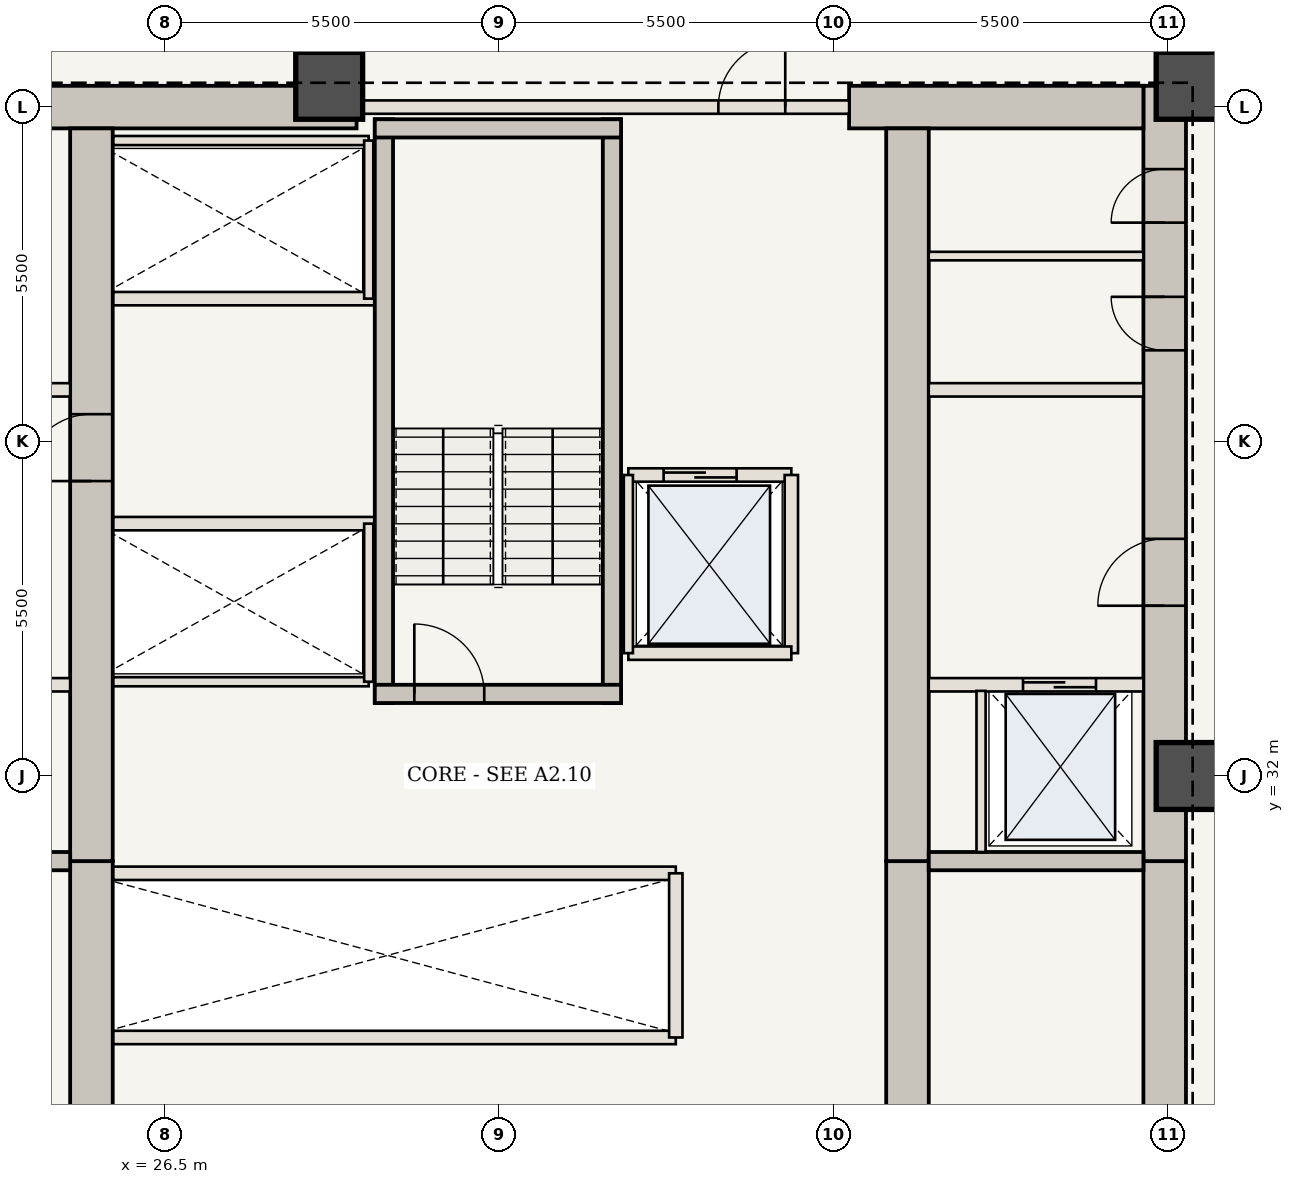
"""IFC4 building model, lengths in metres.
Left out: names, types, materials, properties, quantities, classifications, styles, units other than length and angle.
Written with IfcOpenShell. Run it as: python <this file> out.ifc"""

import sys

from ifc_helpers import new_model, si_unit, direction, frame, frame_2d, origin, origin_2d, place, context, subcontext, project, spatial, rectangle, extrude, element, fill, save


model = new_model("IFC4")
c1 = context("Model", 3, precision=1e-05, world=origin(), true_north=direction((0.0, 1.0)))
c2 = subcontext(c1, "Body", "Model", "MODEL_VIEW")
j1 = project(units=[si_unit("LENGTHUNIT", "METRE"), si_unit("PLANEANGLEUNIT", "RADIAN")], contexts=[c1])
p1 = place(None, origin())
s1 = spatial("IfcSite", under=j1, at=p1, CompositionType="ELEMENT")
p2 = place(p1, origin())
s2 = spatial("IfcBuilding", under=s1, at=p2, CompositionType="ELEMENT")
p3 = place(p2, frame((0.0, 0.0, 38.85)))
s3 = spatial("IfcBuildingStorey", under=s2, at=p3, CompositionType="ELEMENT", Elevation=38.85)
p4 = place(p3, frame((42.94, 20.6, 0.0), z_axis=(0.0, 0.0, 1.0), x_axis=(0.0, 1.0, 0.0)))
e1 = element("IfcWall", 1, at=p4, inside=s3, PredefinedType="SHEAR", context=c2, shape_type="SweptSolid", body=[
    extrude(rectangle(XDim=10.0, YDim=0.7, at=frame_2d((5.0, 0.0))), origin(), (0.0, 0.0, 1.0), 3.5),
])
p5 = place(p4, frame((1.15, 0.0, 0.0)))
e2 = element("IfcOpeningElement", 2, at=p5, cuts=e1, PredefinedType="OPENING", context=c2, shape_type="SweptSolid", body=[
    extrude(rectangle(XDim=1.15, YDim=2.15, at=frame_2d((0.575, 1.075))), frame((0.0, 0.36, 0.0), z_axis=(0.0, -1.0, 0.0), x_axis=(1.0, 0.0, 0.0)), (0.0, 0.0, 1.0), 0.72),
])
p6 = place(p3, frame((42.94, 30.6, 0.0), z_axis=(0.0, 0.0, 1.0), x_axis=(0.0, 1.0, 0.0)))
e3 = element("IfcWall", 3, at=p6, inside=s3, PredefinedType="SHEAR", context=c2, shape_type="SweptSolid", body=[
    extrude(rectangle(XDim=12.75, YDim=0.7, at=frame_2d((6.375, 0.0))), origin(), (0.0, 0.0, 1.0), 3.5),
])
p7 = place(p6, frame((4.2, 0.0, 0.0)))
e4 = element("IfcOpeningElement", 4, at=p7, cuts=e3, PredefinedType="OPENING", context=c2, shape_type="SweptSolid", body=[
    extrude(rectangle(XDim=1.1, YDim=2.15, at=frame_2d((0.55, 1.075))), frame((0.0, 0.36, 0.0), z_axis=(0.0, -1.0, 0.0), x_axis=(1.0, 0.0, 0.0)), (0.0, 0.0, 1.0), 0.72),
])
p8 = place(p6, frame((8.4, 0.0, 0.0)))
e5 = element("IfcOpeningElement", 5, at=p8, cuts=e3, PredefinedType="OPENING", context=c2, shape_type="SweptSolid", body=[
    extrude(rectangle(XDim=0.88, YDim=2.1, at=frame_2d((0.44, 1.05))), frame((0.0, 0.36, 0.0), z_axis=(0.0, -1.0, 0.0), x_axis=(1.0, 0.0, 0.0)), (0.0, 0.0, 1.0), 0.72),
])
p9 = place(p6, frame((10.5, 0.0, 0.0)))
e6 = element("IfcOpeningElement", 6, at=p9, cuts=e3, PredefinedType="OPENING", context=c2, shape_type="SweptSolid", body=[
    extrude(rectangle(XDim=0.88, YDim=2.1, at=frame_2d((0.44, 1.05))), frame((0.0, 0.36, 0.0), z_axis=(0.0, -1.0, 0.0), x_axis=(1.0, 0.0, 0.0)), (0.0, 0.0, 1.0), 0.72),
])
p10 = place(p3, frame((21.41, 43.0, 0.0), z_axis=(0.0, 0.0, 1.0), x_axis=(1.0, 0.0, 0.0)))
e7 = element("IfcWall", 7, at=p10, inside=s3, PredefinedType="SHEAR", context=c2, shape_type="SweptSolid", body=[
    extrude(rectangle(XDim=8.24, YDim=0.7, at=frame_2d((4.12, 0.0))), origin(), (0.0, 0.0, 1.0), 3.5),
])
p11 = place(p3, frame((37.75, 43.0, 0.0), z_axis=(0.0, 0.0, 1.0), x_axis=(1.0, 0.0, 0.0)))
e8 = element("IfcWall", 8, at=p11, inside=s3, PredefinedType="SHEAR", context=c2, shape_type="SweptSolid", body=[
    extrude(rectangle(XDim=4.84, YDim=0.7, at=frame_2d((2.42, 0.0))), origin(), (0.0, 0.0, 1.0), 3.5),
])
p12 = place(p3, frame((25.29, 21.3, 0.0), z_axis=(0.0, 0.0, 1.0), x_axis=(0.0, 1.0, 0.0)))
e9 = element("IfcWall", 9, at=p12, inside=s3, PredefinedType="SHEAR", context=c2, shape_type="SweptSolid", body=[
    extrude(rectangle(XDim=9.3, YDim=0.7, at=frame_2d((4.65, 0.0))), origin(), (0.0, 0.0, 1.0), 3.5),
])
p13 = place(p3, frame((25.29, 30.6, 0.0), z_axis=(0.0, 0.0, 1.0), x_axis=(0.0, 1.0, 0.0)))
e10 = element("IfcWall", 10, at=p13, inside=s3, PredefinedType="SHEAR", context=c2, shape_type="SweptSolid", body=[
    extrude(rectangle(XDim=12.05, YDim=0.7, at=frame_2d((6.025, 0.0))), origin(), (0.0, 0.0, 1.0), 3.5),
])
p14 = place(p13, frame((6.25, 0.0, 0.0)))
e11 = element("IfcOpeningElement", 11, at=p14, cuts=e10, PredefinedType="OPENING", context=c2, shape_type="SweptSolid", body=[
    extrude(rectangle(XDim=1.1, YDim=2.15, at=frame_2d((0.55, 1.075))), frame((0.0, 0.36, 0.0), z_axis=(0.0, -1.0, 0.0), x_axis=(1.0, 0.0, 0.0)), (0.0, 0.0, 1.0), 0.72),
])
p15 = place(p3, frame((38.71, 21.3, 0.0), z_axis=(0.0, 0.0, 1.0), x_axis=(0.0, 1.0, 0.0)))
e12 = element("IfcWall", 12, at=p15, inside=s3, PredefinedType="SHEAR", context=c2, shape_type="SweptSolid", body=[
    extrude(rectangle(XDim=9.3, YDim=0.7, at=frame_2d((4.65, 0.0))), origin(), (0.0, 0.0, 1.0), 3.5),
])
p16 = place(p3, frame((38.71, 30.6, 0.0), z_axis=(0.0, 0.0, 1.0), x_axis=(0.0, 1.0, 0.0)))
e13 = element("IfcWall", 13, at=p16, inside=s3, PredefinedType="SHEAR", context=c2, shape_type="SweptSolid", body=[
    extrude(rectangle(XDim=12.05, YDim=0.7, at=frame_2d((6.025, 0.0))), origin(), (0.0, 0.0, 1.0), 3.5),
])
for number, where, z_axis, x_axis in (
    (14, (43.35, 32.0, 0.0), (0.0, 0.0, 1.0), (1.0, 0.0, 0.0)),
    (15, (43.35, 43.35, 0.0), (0.0, 0.0, 1.0), (1.0, 0.0, 0.0)),
    (16, (29.2, 43.35, 0.0), (0.0, 0.0, 1.0), (1.0, 0.0, 0.0)),
):
    element("IfcColumn", number, at=place(p3, frame(where, z_axis=z_axis, x_axis=x_axis)), inside=s3, PredefinedType="COLUMN", context=c2, shape_type="SweptSolid", body=[
        extrude(rectangle(XDim=1.1, YDim=1.1, at=origin_2d()), origin(), (0.0, 0.0, 1.0), 3.5),
    ])
for number, where, z_axis, x_axis in (
    (17, (21.41, 30.6, 0.0), (0.0, 0.0, 1.0), (1.0, 0.0, 0.0)),
    (18, (39.06, 30.6, 0.0), (0.0, 0.0, 1.0), (1.0, 0.0, 0.0)),
):
    element("IfcWall", number, at=place(p3, frame(where, z_axis=z_axis, x_axis=x_axis)), inside=s3, PredefinedType="SHEAR", context=c2, shape_type="SweptSolid", body=[
        extrude(rectangle(XDim=3.53, YDim=0.3, at=frame_2d((1.765, 0.0))), origin(), (0.0, 0.0, 1.0), 3.08),
    ])
p17 = place(p3, frame((21.41, 33.5, 0.0), z_axis=(0.0, 0.0, 1.0), x_axis=(1.0, 0.0, 0.0)))
e19 = element("IfcWall", 19, at=p17, inside=s3, PredefinedType="STANDARD", context=c2, shape_type="SweptSolid", body=[
    extrude(rectangle(XDim=3.53, YDim=0.22, at=frame_2d((1.765, 0.0))), origin(), (0.0, 0.0, 1.0), 3.08),
])
p18 = place(p17, frame((0.75, 0.0, 0.0)))
e20 = element("IfcOpeningElement", 20, at=p18, cuts=e19, PredefinedType="OPENING", context=c2, shape_type="SweptSolid", body=[
    extrude(rectangle(XDim=1.2, YDim=2.2, at=frame_2d((0.6, 1.1))), frame((0.0, 0.12, 0.0), z_axis=(0.0, -1.0, 0.0), x_axis=(1.0, 0.0, 0.0)), (0.0, 0.0, 1.0), 0.24),
])
p19 = place(p3, frame((39.06, 33.5, 0.0), z_axis=(0.0, 0.0, 1.0), x_axis=(1.0, 0.0, 0.0)))
e21 = element("IfcWall", 21, at=p19, inside=s3, PredefinedType="STANDARD", context=c2, shape_type="SweptSolid", body=[
    extrude(rectangle(XDim=3.53, YDim=0.22, at=frame_2d((1.765, 0.0))), origin(), (0.0, 0.0, 1.0), 3.08),
])
p20 = place(p19, frame((1.55, 0.0, 0.0)))
e22 = element("IfcOpeningElement", 22, at=p20, cuts=e21, PredefinedType="OPENING", context=c2, shape_type="SweptSolid", body=[
    extrude(rectangle(XDim=1.2, YDim=2.2, at=frame_2d((0.6, 1.1))), frame((0.0, 0.12, 0.0), z_axis=(0.0, -1.0, 0.0), x_axis=(1.0, 0.0, 0.0)), (0.0, 0.0, 1.0), 0.24),
])
p21 = place(p3, frame((39.92, 30.75, 0.0), z_axis=(0.0, 0.0, 1.0), x_axis=(0.0, 1.0, 0.0)))
e23 = element("IfcWall", 23, at=p21, inside=s3, PredefinedType="STANDARD", context=c2, shape_type="SweptSolid", body=[
    extrude(rectangle(XDim=2.65, YDim=0.15, at=frame_2d((1.325, 0.0))), origin(), (0.0, 0.0, 1.0), 3.08),
])
for number, where, z_axis, x_axis in (
    (24, (21.41, 38.35, 0.0), (0.0, 0.0, 1.0), (1.0, 0.0, 0.0)),
    (25, (39.06, 38.35, 0.0), (0.0, 0.0, 1.0), (1.0, 0.0, 0.0)),
):
    element("IfcWall", number, at=place(p3, frame(where, z_axis=z_axis, x_axis=x_axis)), inside=s3, PredefinedType="STANDARD", context=c2, shape_type="SweptSolid", body=[
        extrude(rectangle(XDim=3.53, YDim=0.22, at=frame_2d((1.765, 0.0))), origin(), (0.0, 0.0, 1.0), 3.08),
    ])
p22 = place(p3, frame((39.06, 40.55, 0.0), z_axis=(0.0, 0.0, 1.0), x_axis=(1.0, 0.0, 0.0)))
e26 = element("IfcWall", 26, at=p22, inside=s3, PredefinedType="STANDARD", context=c2, shape_type="SweptSolid", body=[
    extrude(rectangle(XDim=3.53, YDim=0.14, at=frame_2d((1.765, 0.0))), origin(), (0.0, 0.0, 1.0), 3.08),
])
for number, where, z_axis, x_axis in (
    (27, (25.65, 27.7, 0.0), (0.0, 0.0, 1.0), (1.0, 0.0, 0.0)),
    (28, (25.65, 30.4, 0.0), (0.0, 0.0, 1.0), (1.0, 0.0, 0.0)),
):
    element("IfcWall", number, at=place(p3, frame(where, z_axis=z_axis, x_axis=x_axis)), inside=s3, PredefinedType="STANDARD", context=c2, shape_type="SweptSolid", body=[
        extrude(rectangle(XDim=9.25, YDim=0.22, at=frame_2d((4.625, 0.0))), origin(), (0.0, 0.0, 1.0), 3.08),
    ])
p23 = place(p3, frame((34.9, 27.7, 0.0), z_axis=(0.0, 0.0, 1.0), x_axis=(0.0, 1.0, 0.0)))
e29 = element("IfcWall", 29, at=p23, inside=s3, PredefinedType="STANDARD", context=c2, shape_type="SweptSolid", body=[
    extrude(rectangle(XDim=2.7, YDim=0.22, at=frame_2d((1.35, 0.0))), origin(), (0.0, 0.0, 1.0), 3.08),
])
p24 = place(p3, frame((25.65, 36.15, 0.0), z_axis=(0.0, 0.0, 1.0), x_axis=(1.0, 0.0, 0.0)))
e30 = element("IfcWall", 30, at=p24, inside=s3, PredefinedType="STANDARD", context=c2, shape_type="SweptSolid", body=[
    extrude(rectangle(XDim=4.3, YDim=0.22, at=frame_2d((2.15, 0.0))), origin(), (0.0, 0.0, 1.0), 3.08),
])
p25 = place(p3, frame((25.65, 33.55, 0.0), z_axis=(0.0, 0.0, 1.0), x_axis=(1.0, 0.0, 0.0)))
e31 = element("IfcWall", 31, at=p25, inside=s3, PredefinedType="STANDARD", context=c2, shape_type="SweptSolid", body=[
    extrude(rectangle(XDim=4.2, YDim=0.15, at=frame_2d((2.1, 0.0))), origin(), (0.0, 0.0, 1.0), 3.08),
])
p26 = place(p3, frame((29.85, 33.55, 0.0), z_axis=(0.0, 0.0, 1.0), x_axis=(0.0, 1.0, 0.0)))
e32 = element("IfcWall", 32, at=p26, inside=s3, PredefinedType="STANDARD", context=c2, shape_type="SweptSolid", body=[
    extrude(rectangle(XDim=2.6, YDim=0.15, at=frame_2d((1.3, 0.0))), origin(), (0.0, 0.0, 1.0), 3.08),
])
p27 = place(p3, frame((25.65, 39.85, 0.0), z_axis=(0.0, 0.0, 1.0), x_axis=(1.0, 0.0, 0.0)))
e33 = element("IfcWall", 33, at=p27, inside=s3, PredefinedType="STANDARD", context=c2, shape_type="SweptSolid", body=[
    extrude(rectangle(XDim=4.3, YDim=0.22, at=frame_2d((2.15, 0.0))), origin(), (0.0, 0.0, 1.0), 3.08),
])
p28 = place(p3, frame((25.65, 42.45, 0.0), z_axis=(0.0, 0.0, 1.0), x_axis=(1.0, 0.0, 0.0)))
e34 = element("IfcWall", 34, at=p28, inside=s3, PredefinedType="STANDARD", context=c2, shape_type="SweptSolid", body=[
    extrude(rectangle(XDim=4.2, YDim=0.15, at=frame_2d((2.1, 0.0))), origin(), (0.0, 0.0, 1.0), 3.08),
])
p29 = place(p3, frame((29.85, 39.85, 0.0), z_axis=(0.0, 0.0, 1.0), x_axis=(0.0, 1.0, 0.0)))
e35 = element("IfcWall", 35, at=p29, inside=s3, PredefinedType="STANDARD", context=c2, shape_type="SweptSolid", body=[
    extrude(rectangle(XDim=2.6, YDim=0.15, at=frame_2d((1.3, 0.0))), origin(), (0.0, 0.0, 1.0), 3.08),
])
for number, where, z_axis, x_axis in (
    (36, (30.1, 33.2, 0.0), (0.0, 0.0, 1.0), (0.0, 1.0, 0.0)),
    (37, (33.85, 33.2, 0.0), (0.0, 0.0, 1.0), (0.0, 1.0, 0.0)),
):
    element("IfcWall", number, at=place(p3, frame(where, z_axis=z_axis, x_axis=x_axis)), inside=s3, PredefinedType="SHEAR", context=c2, shape_type="SweptSolid", body=[
        extrude(rectangle(XDim=9.6, YDim=0.3, at=frame_2d((4.8, 0.0))), origin(), (0.0, 0.0, 1.0), 3.08),
    ])
p30 = place(p3, frame((29.95, 33.35, 0.0), z_axis=(0.0, 0.0, 1.0), x_axis=(1.0, 0.0, 0.0)))
e38 = element("IfcWall", 38, at=p30, inside=s3, PredefinedType="SHEAR", context=c2, shape_type="SweptSolid", body=[
    extrude(rectangle(XDim=4.05, YDim=0.3, at=frame_2d((2.025, 0.0))), origin(), (0.0, 0.0, 1.0), 3.08),
])
p31 = place(p30, frame((0.65, 0.0, 0.0)))
e39 = element("IfcOpeningElement", 39, at=p31, cuts=e38, PredefinedType="OPENING", context=c2, shape_type="SweptSolid", body=[
    extrude(rectangle(XDim=1.15, YDim=2.15, at=frame_2d((0.575, 1.075))), frame((0.0, 0.16, 0.0), z_axis=(0.0, -1.0, 0.0), x_axis=(1.0, 0.0, 0.0)), (0.0, 0.0, 1.0), 0.32),
])
p32 = place(p3, frame((29.95, 42.65, 0.0), z_axis=(0.0, 0.0, 1.0), x_axis=(1.0, 0.0, 0.0)))
e40 = element("IfcWall", 40, at=p32, inside=s3, PredefinedType="SHEAR", context=c2, shape_type="SweptSolid", body=[
    extrude(rectangle(XDim=4.05, YDim=0.3, at=frame_2d((2.025, 0.0))), origin(), (0.0, 0.0, 1.0), 3.08),
])
p33 = place(p3, frame((29.65, 43.0, 0.0), z_axis=(0.0, 0.0, 1.0), x_axis=(1.0, 0.0, 0.0)))
e41 = element("IfcWall", 41, at=p33, inside=s3, PredefinedType="STANDARD", context=c2, shape_type="SweptSolid", body=[
    extrude(rectangle(XDim=8.1, YDim=0.22, at=frame_2d((4.05, 0.0))), origin(), (0.0, 0.0, 1.0), 3.08),
])
p34 = place(p33, frame((5.95, 0.0, 0.0)))
e42 = element("IfcOpeningElement", 42, at=p34, cuts=e41, PredefinedType="OPENING", context=c2, shape_type="SweptSolid", body=[
    extrude(rectangle(XDim=1.1, YDim=2.15, at=frame_2d((0.55, 1.075))), frame((0.0, 0.12, 0.0), z_axis=(0.0, -1.0, 0.0), x_axis=(1.0, 0.0, 0.0)), (0.0, 0.0, 1.0), 0.24),
])
p35 = place(p3, frame((34.12, 36.95, 0.0), z_axis=(0.0, 0.0, 1.0), x_axis=(1.0, 0.0, 0.0)))
e43 = element("IfcWall", 43, at=p35, inside=s3, PredefinedType="STANDARD", context=c2, shape_type="SweptSolid", body=[
    extrude(rectangle(XDim=2.68, YDim=0.22, at=frame_2d((1.34, 0.0))), origin(), (0.0, 0.0, 1.0), 3.08),
])
p36 = place(p35, frame((0.58, 0.0, 0.0)))
e44 = element("IfcOpeningElement", 44, at=p36, cuts=e43, PredefinedType="OPENING", context=c2, shape_type="SweptSolid", body=[
    extrude(rectangle(XDim=1.2, YDim=2.2, at=frame_2d((0.6, 1.1))), frame((0.0, 0.12, 0.0), z_axis=(0.0, -1.0, 0.0), x_axis=(1.0, 0.0, 0.0)), (0.0, 0.0, 1.0), 0.24),
])
p37 = place(p3, frame((36.8, 34.02, 0.0), z_axis=(0.0, 0.0, 1.0), x_axis=(0.0, 1.0, 0.0)))
e45 = element("IfcWall", 45, at=p37, inside=s3, PredefinedType="STANDARD", context=c2, shape_type="SweptSolid", body=[
    extrude(rectangle(XDim=2.93, YDim=0.22, at=frame_2d((1.465, 0.0))), origin(), (0.0, 0.0, 1.0), 3.08),
])
p38 = place(p3, frame((34.12, 34.02, 0.0), z_axis=(0.0, 0.0, 1.0), x_axis=(1.0, 0.0, 0.0)))
e46 = element("IfcWall", 46, at=p38, inside=s3, PredefinedType="STANDARD", context=c2, shape_type="SweptSolid", body=[
    extrude(rectangle(XDim=2.68, YDim=0.22, at=frame_2d((1.34, 0.0))), origin(), (0.0, 0.0, 1.0), 3.08),
])
p39 = place(p3, frame((34.12, 34.02, 0.0), z_axis=(0.0, 0.0, 1.0), x_axis=(0.0, 1.0, 0.0)))
e47 = element("IfcWall", 47, at=p39, inside=s3, PredefinedType="STANDARD", context=c2, shape_type="SweptSolid", body=[
    extrude(rectangle(XDim=2.93, YDim=0.15, at=frame_2d((1.465, 0.0))), origin(), (0.0, 0.0, 1.0), 3.08),
])
p40 = place(p7, origin())
e48 = element("IfcDoor", 48, at=p40, inside=s3, OperationType="SINGLE_SWING_LEFT", PredefinedType="DOOR", context=c2, shape_type="SweptSolid", body=[
    extrude(rectangle(XDim=1.1, YDim=2.15, at=frame_2d((0.55, 1.075))), frame((0.0, 0.025, 0.0), z_axis=(0.0, -1.0, 0.0), x_axis=(1.0, 0.0, 0.0)), (0.0, 0.0, 1.0), 0.05),
])
fill(e4, e48)
p41 = place(p14, origin())
e49 = element("IfcDoor", 49, at=p41, inside=s3, OperationType="SINGLE_SWING_LEFT", PredefinedType="DOOR", context=c2, shape_type="SweptSolid", body=[
    extrude(rectangle(XDim=1.1, YDim=2.15, at=frame_2d((0.55, 1.075))), frame((0.0, 0.025, 0.0), z_axis=(0.0, -1.0, 0.0), x_axis=(1.0, 0.0, 0.0)), (0.0, 0.0, 1.0), 0.05),
])
fill(e11, e49)
p42 = place(p8, origin())
e50 = element("IfcDoor", 50, at=p42, inside=s3, OperationType="SINGLE_SWING_RIGHT", PredefinedType="DOOR", context=c2, shape_type="SweptSolid", body=[
    extrude(rectangle(XDim=0.88, YDim=2.1, at=frame_2d((0.44, 1.05))), frame((0.0, 0.025, 0.0), z_axis=(0.0, -1.0, 0.0), x_axis=(1.0, 0.0, 0.0)), (0.0, 0.0, 1.0), 0.05),
])
fill(e5, e50)
p43 = place(p9, origin())
e51 = element("IfcDoor", 51, at=p43, inside=s3, OperationType="SINGLE_SWING_LEFT", PredefinedType="DOOR", context=c2, shape_type="SweptSolid", body=[
    extrude(rectangle(XDim=0.88, YDim=2.1, at=frame_2d((0.44, 1.05))), frame((0.0, 0.025, 0.0), z_axis=(0.0, -1.0, 0.0), x_axis=(1.0, 0.0, 0.0)), (0.0, 0.0, 1.0), 0.05),
])
fill(e6, e51)
p44 = place(p20, origin())
e52 = element("IfcDoor", 52, at=p44, inside=s3, OperationType="DOUBLE_DOOR_SLIDING", PredefinedType="DOOR", context=c2, shape_type="SweptSolid", body=[
    extrude(rectangle(XDim=1.2, YDim=2.2, at=frame_2d((0.6, 1.1))), frame((0.0, 0.025, 0.0), z_axis=(0.0, -1.0, 0.0), x_axis=(1.0, 0.0, 0.0)), (0.0, 0.0, 1.0), 0.05),
])
fill(e22, e52)
p45 = place(p31, origin())
e53 = element("IfcDoor", 53, at=p45, inside=s3, OperationType="SINGLE_SWING_LEFT", PredefinedType="DOOR", context=c2, shape_type="SweptSolid", body=[
    extrude(rectangle(XDim=1.15, YDim=2.15, at=frame_2d((0.575, 1.075))), frame((0.0, 0.025, 0.0), z_axis=(0.0, -1.0, 0.0), x_axis=(1.0, 0.0, 0.0)), (0.0, 0.0, 1.0), 0.05),
])
fill(e39, e53)
p46 = place(p34, origin())
e54 = element("IfcDoor", 54, at=p46, inside=s3, OperationType="SINGLE_SWING_RIGHT", PredefinedType="DOOR", context=c2, shape_type="SweptSolid", body=[
    extrude(rectangle(XDim=1.1, YDim=2.15, at=frame_2d((0.55, 1.075))), frame((0.0, 0.025, 0.0), z_axis=(0.0, -1.0, 0.0), x_axis=(1.0, 0.0, 0.0)), (0.0, 0.0, 1.0), 0.05),
])
fill(e42, e54)
p47 = place(p36, origin())
e55 = element("IfcDoor", 55, at=p47, inside=s3, OperationType="DOUBLE_DOOR_SLIDING", PredefinedType="DOOR", context=c2, shape_type="SweptSolid", body=[
    extrude(rectangle(XDim=1.2, YDim=2.2, at=frame_2d((0.6, 1.1))), frame((0.0, 0.025, 0.0), z_axis=(0.0, -1.0, 0.0), x_axis=(1.0, 0.0, 0.0)), (0.0, 0.0, 1.0), 0.05),
])
fill(e44, e55)
save(model, sys.argv[1])
